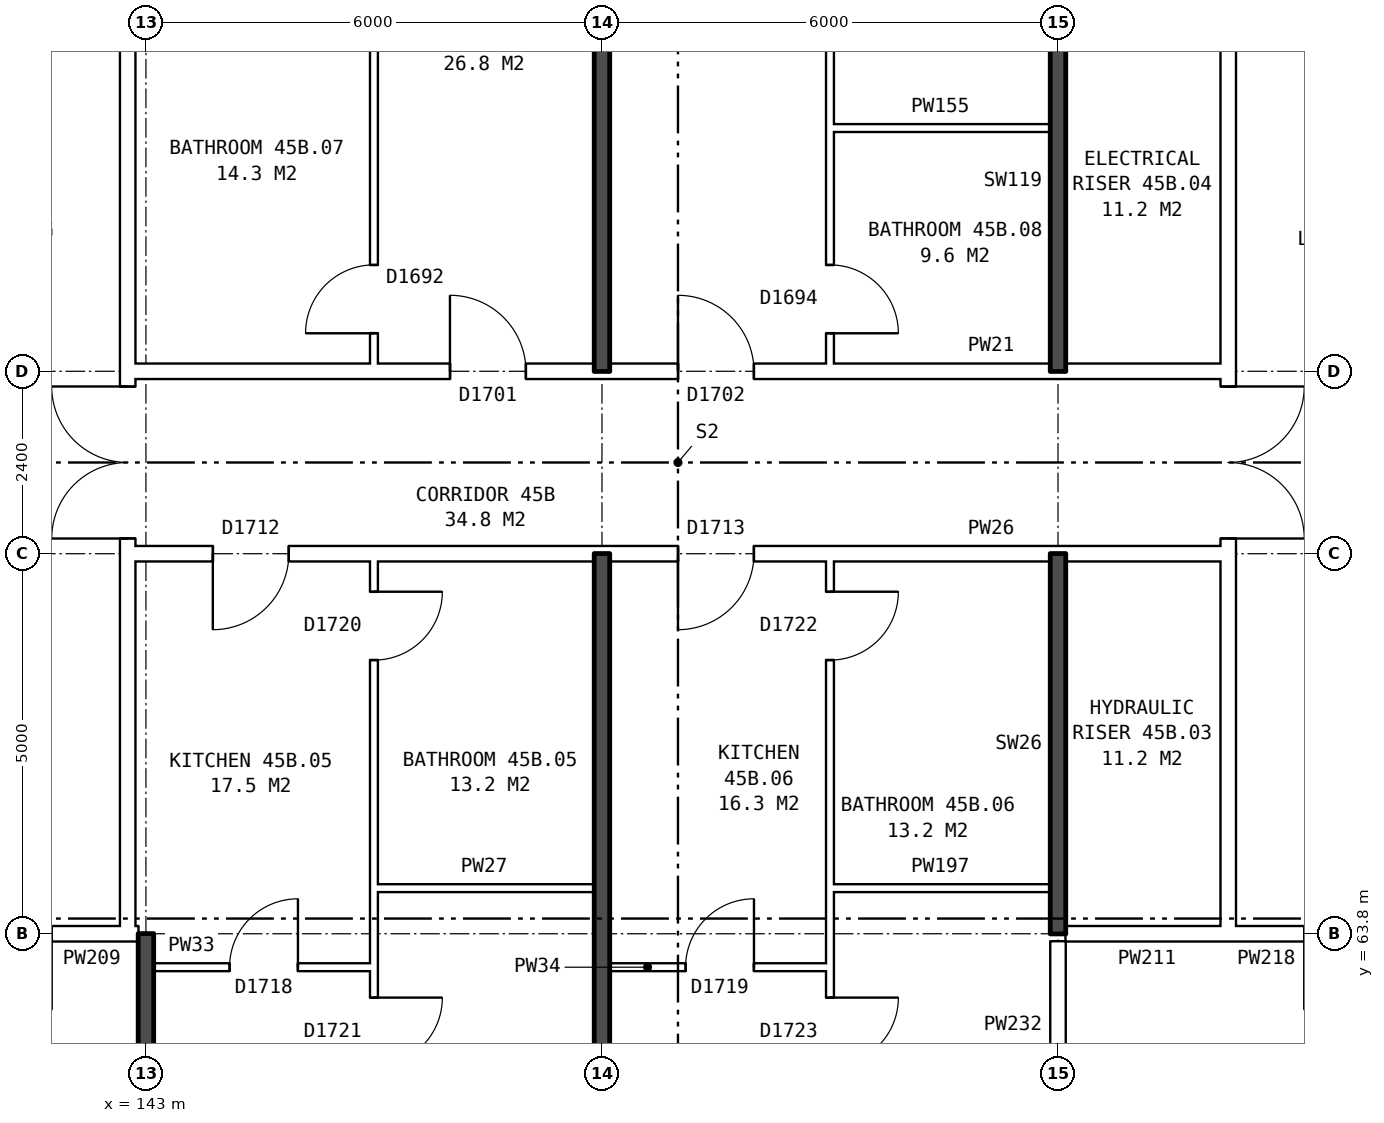
"""IFC4 building model, lengths in metres.
Left out: names, types, materials, properties, quantities, classifications, styles, units other than length and angle.
Written with IfcOpenShell. Run it as: python <this file> out.ifc"""

import sys

from ifc_helpers import new_model, si_unit, direction, frame, frame_2d, origin, place, context, subcontext, project, spatial, rectangle, extrude, element, fill, save


model = new_model("IFC4")
c1 = context("Model", 3, precision=1e-05, world=origin(), true_north=direction((0.0, 1.0)))
c2 = subcontext(c1, "Body", "Model", "MODEL_VIEW")
j1 = project(units=[si_unit("LENGTHUNIT", "METRE"), si_unit("PLANEANGLEUNIT", "RADIAN")], contexts=[c1])
p1 = place(None, origin())
s1 = spatial("IfcSite", under=j1, at=p1, CompositionType="ELEMENT")
p2 = place(p1, origin())
s2 = spatial("IfcBuilding", under=s1, at=p2, CompositionType="ELEMENT")
p3 = place(p2, frame((0.0, 0.0, 160.9)))
s3 = spatial("IfcBuildingStorey", under=s2, at=p3, CompositionType="ELEMENT", Elevation=160.9)
p4 = place(p3, frame((142.76, 63.9, 0.0), z_axis=(0.0, 0.0, 1.0), x_axis=(0.0, 1.0, 0.0)))
e1 = element("IfcWall", 1, at=p4, inside=s3, PredefinedType="PARTITIONING", context=c2, shape_type="SweptSolid", body=[
    extrude(rectangle(XDim=12.2, YDim=0.2, at=frame_2d((6.1, 0.0))), origin(), (0.0, 0.0, 1.0), 2.85),
])
p5 = place(p4, frame((5.1, 0.0, 0.0)))
e2 = element("IfcOpeningElement", 2, at=p5, cuts=e1, PredefinedType="OPENING", context=c2, shape_type="SweptSolid", body=[
    extrude(rectangle(XDim=2.0, YDim=2.1, at=frame_2d((1.0, 1.05))), frame((0.0, 0.11, 0.0), z_axis=(0.0, -1.0, 0.0), x_axis=(1.0, 0.0, 0.0)), (0.0, 0.0, 1.0), 0.22),
])
p6 = place(p3, frame((157.24, 63.9, 0.0), z_axis=(0.0, 0.0, 1.0), x_axis=(0.0, 1.0, 0.0)))
e3 = element("IfcWall", 3, at=p6, inside=s3, PredefinedType="PARTITIONING", context=c2, shape_type="SweptSolid", body=[
    extrude(rectangle(XDim=12.2, YDim=0.2, at=frame_2d((6.1, 0.0))), origin(), (0.0, 0.0, 1.0), 2.85),
])
p7 = place(p6, frame((5.1, 0.0, 0.0)))
e4 = element("IfcOpeningElement", 4, at=p7, cuts=e3, PredefinedType="OPENING", context=c2, shape_type="SweptSolid", body=[
    extrude(rectangle(XDim=2.0, YDim=2.1, at=frame_2d((1.0, 1.05))), frame((0.0, 0.11, 0.0), z_axis=(0.0, -1.0, 0.0), x_axis=(1.0, 0.0, 0.0)), (0.0, 0.0, 1.0), 0.22),
])
p8 = place(p3, frame((143.1, 63.36, 0.0), z_axis=(0.0, 0.0, 1.0), x_axis=(1.0, 0.0, 0.0)))
e5 = element("IfcWall", 5, at=p8, inside=s3, PredefinedType="PARTITIONING", context=c2, shape_type="SweptSolid", body=[
    extrude(rectangle(XDim=2.9, YDim=0.1, at=frame_2d((1.45, 0.0))), origin(), (0.0, 0.0, 1.0), 2.85),
])
p9 = place(p8, frame((1.0, 0.0, 0.0)))
e6 = element("IfcOpeningElement", 6, at=p9, cuts=e5, PredefinedType="OPENING", context=c2, shape_type="SweptSolid", body=[
    extrude(rectangle(XDim=0.9, YDim=2.1, at=frame_2d((0.45, 1.05))), frame((0.0, 0.06, 0.0), z_axis=(0.0, -1.0, 0.0), x_axis=(1.0, 0.0, 0.0)), (0.0, 0.0, 1.0), 0.12),
])
p10 = place(p3, frame((149.1, 63.36, 0.0), z_axis=(0.0, 0.0, 1.0), x_axis=(1.0, 0.0, 0.0)))
e7 = element("IfcWall", 7, at=p10, inside=s3, PredefinedType="PARTITIONING", context=c2, shape_type="SweptSolid", body=[
    extrude(rectangle(XDim=2.9, YDim=0.1, at=frame_2d((1.45, 0.0))), origin(), (0.0, 0.0, 1.0), 2.85),
])
p11 = place(p10, frame((1.0, 0.0, 0.0)))
e8 = element("IfcOpeningElement", 8, at=p11, cuts=e7, PredefinedType="OPENING", context=c2, shape_type="SweptSolid", body=[
    extrude(rectangle(XDim=0.9, YDim=2.1, at=frame_2d((0.45, 1.05))), frame((0.0, 0.06, 0.0), z_axis=(0.0, -1.0, 0.0), x_axis=(1.0, 0.0, 0.0)), (0.0, 0.0, 1.0), 0.12),
])
p12 = place(p3, frame((139.76, 63.8, 0.0), z_axis=(0.0, 0.0, 1.0), x_axis=(1.0, 0.0, 0.0)))
e9 = element("IfcWall", 9, at=p12, inside=s3, PredefinedType="PARTITIONING", context=c2, shape_type="SweptSolid", body=[
    extrude(rectangle(XDim=3.0, YDim=0.2, at=frame_2d((1.5, 0.0))), origin(), (0.0, 0.0, 1.0), 2.85),
])
p13 = place(p12, frame((1.0, 0.0, 0.0)))
e10 = element("IfcOpeningElement", 10, at=p13, cuts=e9, PredefinedType="OPENING", context=c2, shape_type="SweptSolid", body=[
    extrude(rectangle(XDim=1.0, YDim=2.1, at=frame_2d((0.5, 1.05))), frame((0.0, 0.11, 0.0), z_axis=(0.0, -1.0, 0.0), x_axis=(1.0, 0.0, 0.0)), (0.0, 0.0, 1.0), 0.22),
])
p14 = place(p3, frame((142.76, 63.8, 0.0), z_axis=(0.0, 0.0, 1.0), x_axis=(1.0, 0.0, 0.0)))
e11 = element("IfcWall", 11, at=p14, inside=s3, PredefinedType="PARTITIONING", context=c2, shape_type="SweptSolid", body=[
    extrude(rectangle(XDim=0.14, YDim=0.2, at=frame_2d((0.07, 0.0))), origin(), (0.0, 0.0, 1.0), 2.85),
])
p15 = place(p3, frame((155.1, 63.8, 0.0), z_axis=(0.0, 0.0, 1.0), x_axis=(1.0, 0.0, 0.0)))
e12 = element("IfcWall", 12, at=p15, inside=s3, PredefinedType="PARTITIONING", context=c2, shape_type="SweptSolid", body=[
    extrude(rectangle(XDim=2.14, YDim=0.2, at=frame_2d((1.07, 0.0))), origin(), (0.0, 0.0, 1.0), 2.85),
])
p16 = place(p3, frame((157.24, 63.8, 0.0), z_axis=(0.0, 0.0, 1.0), x_axis=(1.0, 0.0, 0.0)))
e13 = element("IfcWall", 13, at=p16, inside=s3, PredefinedType="PARTITIONING", context=c2, shape_type="SweptSolid", body=[
    extrude(rectangle(XDim=3.0, YDim=0.2, at=frame_2d((1.5, 0.0))), origin(), (0.0, 0.0, 1.0), 2.85),
])
p17 = place(p16, frame((1.0, 0.0, 0.0)))
e14 = element("IfcOpeningElement", 14, at=p17, cuts=e13, PredefinedType="OPENING", context=c2, shape_type="SweptSolid", body=[
    extrude(rectangle(XDim=1.0, YDim=2.1, at=frame_2d((0.5, 1.05))), frame((0.0, 0.11, 0.0), z_axis=(0.0, -1.0, 0.0), x_axis=(1.0, 0.0, 0.0)), (0.0, 0.0, 1.0), 0.22),
])
for number, where, z_axis, x_axis in (
    (15, (146.0, 64.4, 0.0), (0.0, 0.0, 1.0), (1.0, 0.0, 0.0)),
    (16, (152.0, 64.4, 0.0), (0.0, 0.0, 1.0), (1.0, 0.0, 0.0)),
):
    element("IfcWall", number, at=place(p3, frame(where, z_axis=z_axis, x_axis=x_axis)), inside=s3, PredefinedType="PARTITIONING", context=c2, shape_type="SweptSolid", body=[
        extrude(rectangle(XDim=2.9, YDim=0.1, at=frame_2d((1.45, 0.0))), origin(), (0.0, 0.0, 1.0), 2.85),
    ])
p18 = place(p3, frame((142.76, 68.8, 0.0), z_axis=(0.0, 0.0, 1.0), x_axis=(1.0, 0.0, 0.0)))
e17 = element("IfcWall", 17, at=p18, inside=s3, PredefinedType="PARTITIONING", context=c2, shape_type="SweptSolid", body=[
    extrude(rectangle(XDim=14.48, YDim=0.2, at=frame_2d((7.24, 0.0))), origin(), (0.0, 0.0, 1.0), 2.85),
])
p19 = place(p18, frame((1.12, 0.0, 0.0)))
e18 = element("IfcOpeningElement", 18, at=p19, cuts=e17, PredefinedType="OPENING", context=c2, shape_type="SweptSolid", body=[
    extrude(rectangle(XDim=1.0, YDim=2.1, at=frame_2d((0.5, 1.05))), frame((0.0, 0.11, 0.0), z_axis=(0.0, -1.0, 0.0), x_axis=(1.0, 0.0, 0.0)), (0.0, 0.0, 1.0), 0.22),
])
p20 = place(p18, frame((7.24, 0.0, 0.0)))
e19 = element("IfcOpeningElement", 19, at=p20, cuts=e17, PredefinedType="OPENING", context=c2, shape_type="SweptSolid", body=[
    extrude(rectangle(XDim=1.0, YDim=2.1, at=frame_2d((0.5, 1.05))), frame((0.0, 0.11, 0.0), z_axis=(0.0, -1.0, 0.0), x_axis=(1.0, 0.0, 0.0)), (0.0, 0.0, 1.0), 0.22),
])
p21 = place(p3, frame((142.76, 71.2, 0.0), z_axis=(0.0, 0.0, 1.0), x_axis=(1.0, 0.0, 0.0)))
e20 = element("IfcWall", 20, at=p21, inside=s3, PredefinedType="PARTITIONING", context=c2, shape_type="SweptSolid", body=[
    extrude(rectangle(XDim=14.48, YDim=0.2, at=frame_2d((7.24, 0.0))), origin(), (0.0, 0.0, 1.0), 2.85),
])
p22 = place(p21, frame((4.24, 0.0, 0.0)))
e21 = element("IfcOpeningElement", 21, at=p22, cuts=e20, PredefinedType="OPENING", context=c2, shape_type="SweptSolid", body=[
    extrude(rectangle(XDim=1.0, YDim=2.1, at=frame_2d((0.5, 1.05))), frame((0.0, 0.11, 0.0), z_axis=(0.0, -1.0, 0.0), x_axis=(1.0, 0.0, 0.0)), (0.0, 0.0, 1.0), 0.22),
])
p23 = place(p21, frame((7.24, 0.0, 0.0)))
e22 = element("IfcOpeningElement", 22, at=p23, cuts=e20, PredefinedType="OPENING", context=c2, shape_type="SweptSolid", body=[
    extrude(rectangle(XDim=1.0, YDim=2.1, at=frame_2d((0.5, 1.05))), frame((0.0, 0.11, 0.0), z_axis=(0.0, -1.0, 0.0), x_axis=(1.0, 0.0, 0.0)), (0.0, 0.0, 1.0), 0.22),
])
p24 = place(p3, frame((152.0, 74.4, 0.0), z_axis=(0.0, 0.0, 1.0), x_axis=(1.0, 0.0, 0.0)))
e23 = element("IfcWall", 23, at=p24, inside=s3, PredefinedType="PARTITIONING", context=c2, shape_type="SweptSolid", body=[
    extrude(rectangle(XDim=2.9, YDim=0.1, at=frame_2d((1.45, 0.0))), origin(), (0.0, 0.0, 1.0), 2.85),
])
p25 = place(p3, frame((143.0, 54.36, 0.0), z_axis=(0.0, 0.0, 1.0), x_axis=(0.0, 1.0, 0.0)))
e24 = element("IfcWall", 24, at=p25, inside=s3, PredefinedType="SOLIDWALL", context=c2, shape_type="SweptSolid", body=[
    extrude(rectangle(XDim=9.44, YDim=0.2, at=frame_2d((4.72, 0.0))), origin(), (0.0, 0.0, 1.0), 2.85),
])
p26 = place(p3, frame((146.0, 54.36, 0.0), z_axis=(0.0, 0.0, 1.0), x_axis=(0.0, 1.0, 0.0)))
e25 = element("IfcWall", 25, at=p26, inside=s3, PredefinedType="PARTITIONING", context=c2, shape_type="SweptSolid", body=[
    extrude(rectangle(XDim=14.34, YDim=0.1, at=frame_2d((7.17, 0.0))), origin(), (0.0, 0.0, 1.0), 2.85),
])
p27 = place(p26, frame((7.7, 0.0, 0.0)))
e26 = element("IfcOpeningElement", 26, at=p27, cuts=e25, PredefinedType="OPENING", context=c2, shape_type="SweptSolid", body=[
    extrude(rectangle(XDim=0.9, YDim=2.1, at=frame_2d((0.45, 1.05))), frame((0.0, 0.06, 0.0), z_axis=(0.0, -1.0, 0.0), x_axis=(1.0, 0.0, 0.0)), (0.0, 0.0, 1.0), 0.12),
])
p28 = place(p26, frame((13.04, 0.0, 0.0)))
e27 = element("IfcOpeningElement", 27, at=p28, cuts=e25, PredefinedType="OPENING", context=c2, shape_type="SweptSolid", body=[
    extrude(rectangle(XDim=0.9, YDim=2.1, at=frame_2d((0.45, 1.05))), frame((0.0, 0.06, 0.0), z_axis=(0.0, -1.0, 0.0), x_axis=(1.0, 0.0, 0.0)), (0.0, 0.0, 1.0), 0.12),
])
p29 = place(p3, frame((146.0, 71.3, 0.0), z_axis=(0.0, 0.0, 1.0), x_axis=(0.0, 1.0, 0.0)))
e28 = element("IfcWall", 28, at=p29, inside=s3, PredefinedType="PARTITIONING", context=c2, shape_type="SweptSolid", body=[
    extrude(rectangle(XDim=14.34, YDim=0.1, at=frame_2d((7.17, 0.0))), origin(), (0.0, 0.0, 1.0), 2.85),
])
p30 = place(p29, frame((9.24, 0.0, 0.0)))
e29 = element("IfcOpeningElement", 29, at=p30, cuts=e28, PredefinedType="OPENING", context=c2, shape_type="SweptSolid", body=[
    extrude(rectangle(XDim=0.9, YDim=2.1, at=frame_2d((0.45, 1.05))), frame((0.0, 0.06, 0.0), z_axis=(0.0, -1.0, 0.0), x_axis=(1.0, 0.0, 0.0)), (0.0, 0.0, 1.0), 0.12),
])
p31 = place(p29, frame((0.4, 0.0, 0.0)))
e30 = element("IfcOpeningElement", 30, at=p31, cuts=e28, PredefinedType="OPENING", context=c2, shape_type="SweptSolid", body=[
    extrude(rectangle(XDim=0.9, YDim=2.1, at=frame_2d((0.45, 1.05))), frame((0.0, 0.06, 0.0), z_axis=(0.0, -1.0, 0.0), x_axis=(1.0, 0.0, 0.0)), (0.0, 0.0, 1.0), 0.12),
])
for number, where, z_axis, x_axis in (
    (31, (149.0, 54.36, 0.0), (0.0, 0.0, 1.0), (0.0, 1.0, 0.0)),
    (32, (149.0, 71.2, 0.0), (0.0, 0.0, 1.0), (0.0, 1.0, 0.0)),
):
    element("IfcWall", number, at=place(p3, frame(where, z_axis=z_axis, x_axis=x_axis)), inside=s3, PredefinedType="SOLIDWALL", context=c2, shape_type="SweptSolid", body=[
        extrude(rectangle(XDim=14.44, YDim=0.2, at=frame_2d((7.22, 0.0))), origin(), (0.0, 0.0, 1.0), 2.85),
    ])
p32 = place(p3, frame((152.0, 54.36, 0.0), z_axis=(0.0, 0.0, 1.0), x_axis=(0.0, 1.0, 0.0)))
e33 = element("IfcWall", 33, at=p32, inside=s3, PredefinedType="PARTITIONING", context=c2, shape_type="SweptSolid", body=[
    extrude(rectangle(XDim=14.34, YDim=0.1, at=frame_2d((7.17, 0.0))), origin(), (0.0, 0.0, 1.0), 2.85),
])
p33 = place(p32, frame((7.7, 0.0, 0.0)))
e34 = element("IfcOpeningElement", 34, at=p33, cuts=e33, PredefinedType="OPENING", context=c2, shape_type="SweptSolid", body=[
    extrude(rectangle(XDim=0.9, YDim=2.1, at=frame_2d((0.45, 1.05))), frame((0.0, 0.06, 0.0), z_axis=(0.0, -1.0, 0.0), x_axis=(1.0, 0.0, 0.0)), (0.0, 0.0, 1.0), 0.12),
])
p34 = place(p32, frame((13.04, 0.0, 0.0)))
e35 = element("IfcOpeningElement", 35, at=p34, cuts=e33, PredefinedType="OPENING", context=c2, shape_type="SweptSolid", body=[
    extrude(rectangle(XDim=0.9, YDim=2.1, at=frame_2d((0.45, 1.05))), frame((0.0, 0.06, 0.0), z_axis=(0.0, -1.0, 0.0), x_axis=(1.0, 0.0, 0.0)), (0.0, 0.0, 1.0), 0.12),
])
p35 = place(p3, frame((152.0, 71.3, 0.0), z_axis=(0.0, 0.0, 1.0), x_axis=(0.0, 1.0, 0.0)))
e36 = element("IfcWall", 36, at=p35, inside=s3, PredefinedType="PARTITIONING", context=c2, shape_type="SweptSolid", body=[
    extrude(rectangle(XDim=14.34, YDim=0.1, at=frame_2d((7.17, 0.0))), origin(), (0.0, 0.0, 1.0), 2.85),
])
p36 = place(p35, frame((9.24, 0.0, 0.0)))
e37 = element("IfcOpeningElement", 37, at=p36, cuts=e36, PredefinedType="OPENING", context=c2, shape_type="SweptSolid", body=[
    extrude(rectangle(XDim=0.9, YDim=2.1, at=frame_2d((0.45, 1.05))), frame((0.0, 0.06, 0.0), z_axis=(0.0, -1.0, 0.0), x_axis=(1.0, 0.0, 0.0)), (0.0, 0.0, 1.0), 0.12),
])
p37 = place(p35, frame((0.4, 0.0, 0.0)))
e38 = element("IfcOpeningElement", 38, at=p37, cuts=e36, PredefinedType="OPENING", context=c2, shape_type="SweptSolid", body=[
    extrude(rectangle(XDim=0.9, YDim=2.1, at=frame_2d((0.45, 1.05))), frame((0.0, 0.06, 0.0), z_axis=(0.0, -1.0, 0.0), x_axis=(1.0, 0.0, 0.0)), (0.0, 0.0, 1.0), 0.12),
])
p38 = place(p3, frame((155.0, 61.5, 0.0), z_axis=(0.0, 0.0, 1.0), x_axis=(0.0, 1.0, 0.0)))
e39 = element("IfcWall", 39, at=p38, inside=s3, PredefinedType="PARTITIONING", context=c2, shape_type="SweptSolid", body=[
    extrude(rectangle(XDim=2.2, YDim=0.2, at=frame_2d((1.1, 0.0))), origin(), (0.0, 0.0, 1.0), 2.85),
])
for number, where, z_axis, x_axis in (
    (40, (155.0, 63.8, 0.0), (0.0, 0.0, 1.0), (0.0, 1.0, 0.0)),
    (41, (155.0, 71.2, 0.0), (0.0, 0.0, 1.0), (0.0, 1.0, 0.0)),
):
    element("IfcWall", number, at=place(p3, frame(where, z_axis=z_axis, x_axis=x_axis)), inside=s3, PredefinedType="SOLIDWALL", context=c2, shape_type="SweptSolid", body=[
        extrude(rectangle(XDim=5.0, YDim=0.2, at=frame_2d((2.5, 0.0))), origin(), (0.0, 0.0, 1.0), 2.85),
    ])
p39 = place(p5, origin())
e42 = element("IfcDoor", 42, at=p39, inside=s3, OperationType="DOUBLE_DOOR_SINGLE_SWING", PredefinedType="DOOR", context=c2, shape_type="SweptSolid", body=[
    extrude(rectangle(XDim=2.0, YDim=2.1, at=frame_2d((1.0, 1.05))), frame((0.0, 0.025, 0.0), z_axis=(0.0, -1.0, 0.0), x_axis=(1.0, 0.0, 0.0)), (0.0, 0.0, 1.0), 0.05),
])
fill(e2, e42)
p40 = place(p7, frame((2.0, 0.0, 0.0), z_axis=(0.0, 0.0, 1.0), x_axis=(-1.0, 0.0, 0.0)))
e43 = element("IfcDoor", 43, at=p40, inside=s3, OperationType="DOUBLE_DOOR_SINGLE_SWING", PredefinedType="DOOR", context=c2, shape_type="SweptSolid", body=[
    extrude(rectangle(XDim=2.0, YDim=2.1, at=frame_2d((1.0, 1.05))), frame((0.0, 0.025, 0.0), z_axis=(0.0, -1.0, 0.0), x_axis=(1.0, 0.0, 0.0)), (0.0, 0.0, 1.0), 0.05),
])
fill(e4, e43)
p41 = place(p27, frame((0.9, 0.0, 0.0), z_axis=(0.0, 0.0, 1.0), x_axis=(-1.0, 0.0, 0.0)))
e44 = element("IfcDoor", 44, at=p41, inside=s3, OperationType="SINGLE_SWING_LEFT", PredefinedType="DOOR", context=c2, shape_type="SweptSolid", body=[
    extrude(rectangle(XDim=0.9, YDim=2.1, at=frame_2d((0.45, 1.05))), frame((0.0, 0.025, 0.0), z_axis=(0.0, -1.0, 0.0), x_axis=(1.0, 0.0, 0.0)), (0.0, 0.0, 1.0), 0.05),
])
fill(e26, e44)
p42 = place(p19, frame((1.0, 0.0, 0.0), z_axis=(0.0, 0.0, 1.0), x_axis=(-1.0, 0.0, 0.0)))
e45 = element("IfcDoor", 45, at=p42, inside=s3, OperationType="SINGLE_SWING_RIGHT", PredefinedType="DOOR", context=c2, shape_type="SweptSolid", body=[
    extrude(rectangle(XDim=1.0, YDim=2.1, at=frame_2d((0.5, 1.05))), frame((0.0, 0.025, 0.0), z_axis=(0.0, -1.0, 0.0), x_axis=(1.0, 0.0, 0.0)), (0.0, 0.0, 1.0), 0.05),
])
fill(e18, e45)
p43 = place(p9, origin())
e46 = element("IfcDoor", 46, at=p43, inside=s3, OperationType="SINGLE_SWING_RIGHT", PredefinedType="DOOR", context=c2, shape_type="SweptSolid", body=[
    extrude(rectangle(XDim=0.9, YDim=2.1, at=frame_2d((0.45, 1.05))), frame((0.0, 0.025, 0.0), z_axis=(0.0, -1.0, 0.0), x_axis=(1.0, 0.0, 0.0)), (0.0, 0.0, 1.0), 0.05),
])
fill(e6, e46)
p44 = place(p28, frame((0.9, 0.0, 0.0), z_axis=(0.0, 0.0, 1.0), x_axis=(-1.0, 0.0, 0.0)))
e47 = element("IfcDoor", 47, at=p44, inside=s3, OperationType="SINGLE_SWING_LEFT", PredefinedType="DOOR", context=c2, shape_type="SweptSolid", body=[
    extrude(rectangle(XDim=0.9, YDim=2.1, at=frame_2d((0.45, 1.05))), frame((0.0, 0.025, 0.0), z_axis=(0.0, -1.0, 0.0), x_axis=(1.0, 0.0, 0.0)), (0.0, 0.0, 1.0), 0.05),
])
fill(e27, e47)
p45 = place(p33, frame((0.9, 0.0, 0.0), z_axis=(0.0, 0.0, 1.0), x_axis=(-1.0, 0.0, 0.0)))
e48 = element("IfcDoor", 48, at=p45, inside=s3, OperationType="SINGLE_SWING_LEFT", PredefinedType="DOOR", context=c2, shape_type="SweptSolid", body=[
    extrude(rectangle(XDim=0.9, YDim=2.1, at=frame_2d((0.45, 1.05))), frame((0.0, 0.025, 0.0), z_axis=(0.0, -1.0, 0.0), x_axis=(1.0, 0.0, 0.0)), (0.0, 0.0, 1.0), 0.05),
])
fill(e34, e48)
p46 = place(p20, frame((1.0, 0.0, 0.0), z_axis=(0.0, 0.0, 1.0), x_axis=(-1.0, 0.0, 0.0)))
e49 = element("IfcDoor", 49, at=p46, inside=s3, OperationType="SINGLE_SWING_RIGHT", PredefinedType="DOOR", context=c2, shape_type="SweptSolid", body=[
    extrude(rectangle(XDim=1.0, YDim=2.1, at=frame_2d((0.5, 1.05))), frame((0.0, 0.025, 0.0), z_axis=(0.0, -1.0, 0.0), x_axis=(1.0, 0.0, 0.0)), (0.0, 0.0, 1.0), 0.05),
])
fill(e19, e49)
p47 = place(p11, origin())
e50 = element("IfcDoor", 50, at=p47, inside=s3, OperationType="SINGLE_SWING_RIGHT", PredefinedType="DOOR", context=c2, shape_type="SweptSolid", body=[
    extrude(rectangle(XDim=0.9, YDim=2.1, at=frame_2d((0.45, 1.05))), frame((0.0, 0.025, 0.0), z_axis=(0.0, -1.0, 0.0), x_axis=(1.0, 0.0, 0.0)), (0.0, 0.0, 1.0), 0.05),
])
fill(e8, e50)
p48 = place(p34, frame((0.9, 0.0, 0.0), z_axis=(0.0, 0.0, 1.0), x_axis=(-1.0, 0.0, 0.0)))
e51 = element("IfcDoor", 51, at=p48, inside=s3, OperationType="SINGLE_SWING_LEFT", PredefinedType="DOOR", context=c2, shape_type="SweptSolid", body=[
    extrude(rectangle(XDim=0.9, YDim=2.1, at=frame_2d((0.45, 1.05))), frame((0.0, 0.025, 0.0), z_axis=(0.0, -1.0, 0.0), x_axis=(1.0, 0.0, 0.0)), (0.0, 0.0, 1.0), 0.05),
])
fill(e35, e51)
p49 = place(p22, origin())
e52 = element("IfcDoor", 52, at=p49, inside=s3, OperationType="SINGLE_SWING_LEFT", PredefinedType="DOOR", context=c2, shape_type="SweptSolid", body=[
    extrude(rectangle(XDim=1.0, YDim=2.1, at=frame_2d((0.5, 1.05))), frame((0.0, 0.025, 0.0), z_axis=(0.0, -1.0, 0.0), x_axis=(1.0, 0.0, 0.0)), (0.0, 0.0, 1.0), 0.05),
])
fill(e21, e52)
p50 = place(p31, origin())
e53 = element("IfcDoor", 53, at=p50, inside=s3, OperationType="SINGLE_SWING_LEFT", PredefinedType="DOOR", context=c2, shape_type="SweptSolid", body=[
    extrude(rectangle(XDim=0.9, YDim=2.1, at=frame_2d((0.45, 1.05))), frame((0.0, 0.025, 0.0), z_axis=(0.0, -1.0, 0.0), x_axis=(1.0, 0.0, 0.0)), (0.0, 0.0, 1.0), 0.05),
])
fill(e30, e53)
p51 = place(p23, origin())
e54 = element("IfcDoor", 54, at=p51, inside=s3, OperationType="SINGLE_SWING_LEFT", PredefinedType="DOOR", context=c2, shape_type="SweptSolid", body=[
    extrude(rectangle(XDim=1.0, YDim=2.1, at=frame_2d((0.5, 1.05))), frame((0.0, 0.025, 0.0), z_axis=(0.0, -1.0, 0.0), x_axis=(1.0, 0.0, 0.0)), (0.0, 0.0, 1.0), 0.05),
])
fill(e22, e54)
p52 = place(p37, frame((0.9, 0.0, 0.0), z_axis=(0.0, 0.0, 1.0), x_axis=(-1.0, 0.0, 0.0)))
e55 = element("IfcDoor", 55, at=p52, inside=s3, OperationType="SINGLE_SWING_RIGHT", PredefinedType="DOOR", context=c2, shape_type="SweptSolid", body=[
    extrude(rectangle(XDim=0.9, YDim=2.1, at=frame_2d((0.45, 1.05))), frame((0.0, 0.025, 0.0), z_axis=(0.0, -1.0, 0.0), x_axis=(1.0, 0.0, 0.0)), (0.0, 0.0, 1.0), 0.05),
])
fill(e38, e55)
save(model, sys.argv[1])
